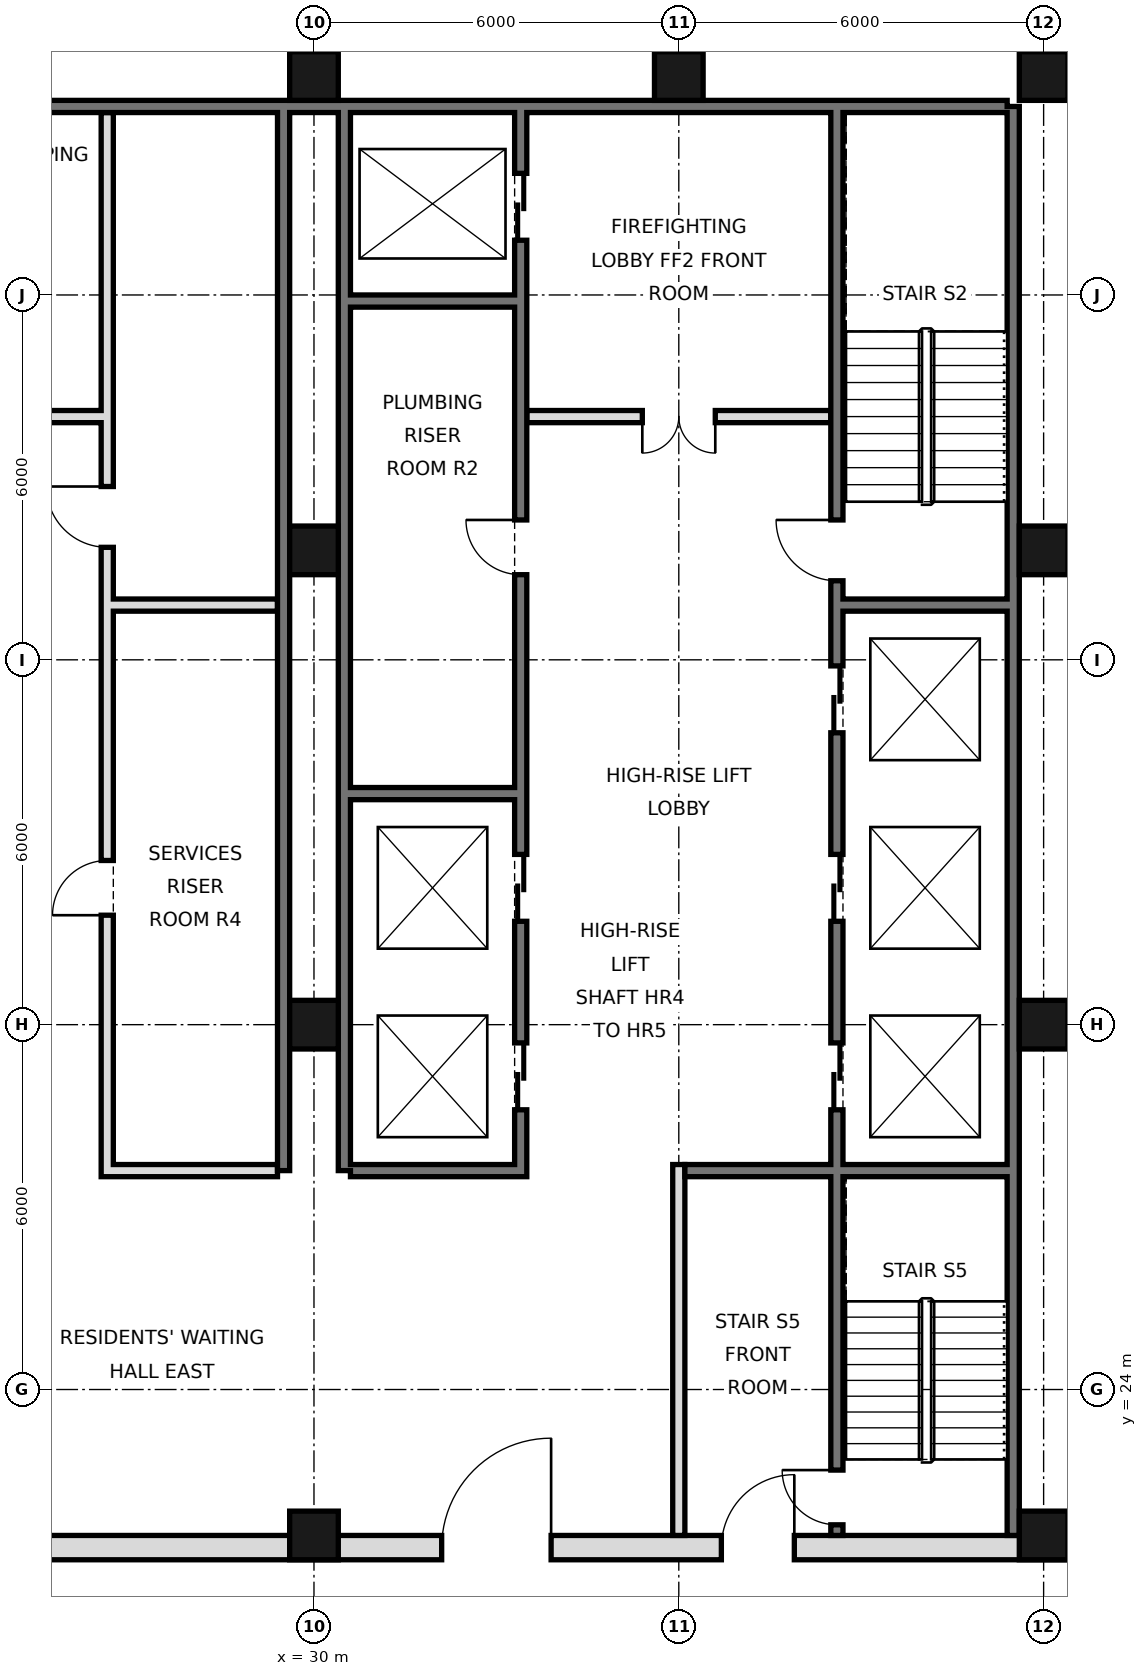
"""IFC4 building model, lengths in metres.
Left out: names, types, materials, properties, quantities, classifications, styles, units other than length and angle.
Written with IfcOpenShell. Run it as: python <this file> out.ifc"""

import sys

from ifc_helpers import new_model, si_unit, direction, frame, frame_2d, origin, origin_2d, place, context, subcontext, project, spatial, rectangle, hollow_rectangle, extrude, element, fill, save


model = new_model("IFC4")
c1 = context("Model", 3, precision=1e-05, world=origin(), true_north=direction((0.0, 1.0)))
c2 = subcontext(c1, "Body", "Model", "MODEL_VIEW")
j1 = project(units=[si_unit("LENGTHUNIT", "METRE"), si_unit("PLANEANGLEUNIT", "RADIAN")], contexts=[c1])
p1 = place(None, origin())
s1 = spatial("IfcSite", under=j1, at=p1, CompositionType="ELEMENT")
p2 = place(p1, origin())
s2 = spatial("IfcBuilding", under=s1, at=p2, CompositionType="ELEMENT")
p3 = place(p2, frame((0.0, 0.0, 246.8)))
s3 = spatial("IfcBuildingStorey", under=s2, at=p3, CompositionType="ELEMENT", Elevation=246.8)
for number, where, z_axis, x_axis in (
    (1, (30.0, 21.6, 0.0), (0.0, 0.0, 1.0), (1.0, 0.0, 0.0)),
    (2, (30.0, 30.0, 0.0), (0.0, 0.0, 1.0), (1.0, 0.0, 0.0)),
    (3, (30.0, 37.8, 0.0), (0.0, 0.0, 1.0), (1.0, 0.0, 0.0)),
    (4, (30.0, 45.6, 0.0), (0.0, 0.0, 1.0), (1.0, 0.0, 0.0)),
    (5, (36.0, 45.6, 0.0), (0.0, 0.0, 1.0), (1.0, 0.0, 0.0)),
    (6, (42.0, 21.6, 0.0), (0.0, 0.0, 1.0), (1.0, 0.0, 0.0)),
    (7, (42.0, 30.0, 0.0), (0.0, 0.0, 1.0), (1.0, 0.0, 0.0)),
    (8, (42.0, 37.8, 0.0), (0.0, 0.0, 1.0), (1.0, 0.0, 0.0)),
    (9, (42.0, 45.6, 0.0), (0.0, 0.0, 1.0), (1.0, 0.0, 0.0)),
):
    element("IfcColumn", number, at=place(p3, frame(where, z_axis=z_axis, x_axis=x_axis)), inside=s3, PredefinedType="COLUMN", context=c2, shape_type="SweptSolid", body=[
        extrude(hollow_rectangle(XDim=0.8, YDim=0.8, WallThickness=0.032, at=origin_2d()), origin(), (0.0, 0.0, 1.0), 3.6),
    ])
p4 = place(p3, frame((41.5, 21.6, 0.0), z_axis=(0.0, 0.0, 1.0), x_axis=(0.0, 1.0, 0.0)))
e10 = element("IfcWall", 10, at=p4, inside=s3, PredefinedType="SOLIDWALL", context=c2, shape_type="SweptSolid", body=[
    extrude(rectangle(XDim=23.5, YDim=0.2, at=frame_2d((11.75, 0.0))), origin(), (0.0, 0.0, 1.0), 3.42),
])
p5 = place(p3, frame((6.6, 45.1, 0.0), z_axis=(0.0, 0.0, 1.0), x_axis=(1.0, 0.0, 0.0)))
e11 = element("IfcWall", 11, at=p5, inside=s3, PredefinedType="SOLIDWALL", context=c2, shape_type="SweptSolid", body=[
    extrude(rectangle(XDim=34.8, YDim=0.2, at=frame_2d((17.4, 0.0))), origin(), (0.0, 0.0, 1.0), 3.42),
])
for number, where, z_axis, x_axis in (
    (12, (29.5, 27.6, 0.0), (0.0, 0.0, 1.0), (0.0, 1.0, 0.0)),
    (13, (30.5, 27.6, 0.0), (0.0, 0.0, 1.0), (0.0, 1.0, 0.0)),
):
    element("IfcWall", number, at=place(p3, frame(where, z_axis=z_axis, x_axis=x_axis)), inside=s3, PredefinedType="SOLIDWALL", context=c2, shape_type="SweptSolid", body=[
        extrude(rectangle(XDim=17.5, YDim=0.2, at=frame_2d((8.75, 0.0))), origin(), (0.0, 0.0, 1.0), 3.42),
    ])
p6 = place(p3, frame((5.6, 21.4, 0.0), z_axis=(0.0, 0.0, 1.0), x_axis=(1.0, 0.0, 0.0)))
e14 = element("IfcWall", 14, at=p6, inside=s3, PredefinedType="SOLIDWALL", context=c2, shape_type="SweptSolid", body=[
    extrude(rectangle(XDim=36.8, YDim=0.4, at=frame_2d((18.4, 0.0))), origin(), (0.0, 0.0, 1.0), 3.42),
])
p7 = place(p6, frame((8.5, 0.0, 0.0)))
e15 = element("IfcOpeningElement", 15, at=p7, cuts=e14, PredefinedType="OPENING", context=c2, shape_type="SweptSolid", body=[
    extrude(rectangle(XDim=1.8, YDim=2.1, at=frame_2d((0.9, 1.05))), frame((0.0, 0.21, 0.0), z_axis=(0.0, -1.0, 0.0), x_axis=(1.0, 0.0, 0.0)), (0.0, 0.0, 1.0), 0.42),
])
p8 = place(p6, frame((17.5, 0.0, 0.0)))
e16 = element("IfcOpeningElement", 16, at=p8, cuts=e14, PredefinedType="OPENING", context=c2, shape_type="SweptSolid", body=[
    extrude(rectangle(XDim=1.8, YDim=2.1, at=frame_2d((0.9, 1.05))), frame((0.0, 0.21, 0.0), z_axis=(0.0, -1.0, 0.0), x_axis=(1.0, 0.0, 0.0)), (0.0, 0.0, 1.0), 0.42),
])
p9 = place(p6, frame((26.5, 0.0, 0.0)))
e17 = element("IfcOpeningElement", 17, at=p9, cuts=e14, PredefinedType="OPENING", context=c2, shape_type="SweptSolid", body=[
    extrude(rectangle(XDim=1.8, YDim=2.1, at=frame_2d((0.9, 1.05))), frame((0.0, 0.21, 0.0), z_axis=(0.0, -1.0, 0.0), x_axis=(1.0, 0.0, 0.0)), (0.0, 0.0, 1.0), 0.42),
])
p10 = place(p6, frame((4.5, 0.0, 0.0)))
e18 = element("IfcOpeningElement", 18, at=p10, cuts=e14, PredefinedType="OPENING", context=c2, shape_type="SweptSolid", body=[
    extrude(rectangle(XDim=1.2, YDim=2.1, at=frame_2d((0.6, 1.05))), frame((0.0, 0.21, 0.0), z_axis=(0.0, -1.0, 0.0), x_axis=(1.0, 0.0, 0.0)), (0.0, 0.0, 1.0), 0.42),
])
p11 = place(p6, frame((31.1, 0.0, 0.0)))
e19 = element("IfcOpeningElement", 19, at=p11, cuts=e14, PredefinedType="OPENING", context=c2, shape_type="SweptSolid", body=[
    extrude(rectangle(XDim=1.2, YDim=2.1, at=frame_2d((0.6, 1.05))), frame((0.0, 0.21, 0.0), z_axis=(0.0, -1.0, 0.0), x_axis=(1.0, 0.0, 0.0)), (0.0, 0.0, 1.0), 0.42),
])
p12 = place(p3, frame((26.6, 27.5, 0.0), z_axis=(0.0, 0.0, 1.0), x_axis=(0.0, 1.0, 0.0)))
e20 = element("IfcWall", 20, at=p12, inside=s3, PredefinedType="SOLIDWALL", context=c2, shape_type="SweptSolid", body=[
    extrude(rectangle(XDim=17.5, YDim=0.2, at=frame_2d((8.75, 0.0))), origin(), (0.0, 0.0, 1.0), 3.42),
])
p13 = place(p12, frame((4.3, 0.0, 0.0)))
e21 = element("IfcOpeningElement", 21, at=p13, cuts=e20, PredefinedType="OPENING", context=c2, shape_type="SweptSolid", body=[
    extrude(rectangle(XDim=0.9, YDim=2.1, at=frame_2d((0.45, 1.05))), frame((0.0, 0.11, 0.0), z_axis=(0.0, -1.0, 0.0), x_axis=(1.0, 0.0, 0.0)), (0.0, 0.0, 1.0), 0.22),
])
p14 = place(p12, frame((10.35, 0.0, 0.0)))
e22 = element("IfcOpeningElement", 22, at=p14, cuts=e20, PredefinedType="OPENING", context=c2, shape_type="SweptSolid", body=[
    extrude(rectangle(XDim=1.0, YDim=2.1, at=frame_2d((0.5, 1.05))), frame((0.0, 0.11, 0.0), z_axis=(0.0, -1.0, 0.0), x_axis=(1.0, 0.0, 0.0)), (0.0, 0.0, 1.0), 0.22),
])
p15 = place(p3, frame((33.4, 27.5, 0.0), z_axis=(0.0, 0.0, 1.0), x_axis=(0.0, 1.0, 0.0)))
e23 = element("IfcWall", 23, at=p15, inside=s3, PredefinedType="SOLIDWALL", context=c2, shape_type="SweptSolid", body=[
    extrude(rectangle(XDim=17.5, YDim=0.2, at=frame_2d((8.75, 0.0))), origin(), (0.0, 0.0, 1.0), 3.42),
])
p16 = place(p15, frame((1.1, 0.0, 0.0)))
e24 = element("IfcOpeningElement", 24, at=p16, cuts=e23, PredefinedType="OPENING", context=c2, shape_type="SweptSolid", body=[
    extrude(rectangle(XDim=1.1, YDim=2.1, at=frame_2d((0.55, 1.05))), frame((0.0, 0.11, 0.0), z_axis=(0.0, -1.0, 0.0), x_axis=(1.0, 0.0, 0.0)), (0.0, 0.0, 1.0), 0.22),
])
p17 = place(p15, frame((4.2, 0.0, 0.0)))
e25 = element("IfcOpeningElement", 25, at=p17, cuts=e23, PredefinedType="OPENING", context=c2, shape_type="SweptSolid", body=[
    extrude(rectangle(XDim=1.1, YDim=2.1, at=frame_2d((0.55, 1.05))), frame((0.0, 0.11, 0.0), z_axis=(0.0, -1.0, 0.0), x_axis=(1.0, 0.0, 0.0)), (0.0, 0.0, 1.0), 0.22),
])
p18 = place(p15, frame((15.4, 0.0, 0.0)))
e26 = element("IfcOpeningElement", 26, at=p18, cuts=e23, PredefinedType="OPENING", context=c2, shape_type="SweptSolid", body=[
    extrude(rectangle(XDim=1.1, YDim=2.1, at=frame_2d((0.55, 1.05))), frame((0.0, 0.11, 0.0), z_axis=(0.0, -1.0, 0.0), x_axis=(1.0, 0.0, 0.0)), (0.0, 0.0, 1.0), 0.22),
])
p19 = place(p15, frame((9.9, 0.0, 0.0)))
e27 = element("IfcOpeningElement", 27, at=p19, cuts=e23, PredefinedType="OPENING", context=c2, shape_type="SweptSolid", body=[
    extrude(rectangle(XDim=0.9, YDim=2.1, at=frame_2d((0.45, 1.05))), frame((0.0, 0.11, 0.0), z_axis=(0.0, -1.0, 0.0), x_axis=(1.0, 0.0, 0.0)), (0.0, 0.0, 1.0), 0.22),
])
p20 = place(p3, frame((36.0, 21.6, 0.0), z_axis=(0.0, 0.0, 1.0), x_axis=(0.0, 1.0, 0.0)))
e28 = element("IfcWall", 28, at=p20, inside=s3, PredefinedType="PARTITIONING", context=c2, shape_type="SweptSolid", body=[
    extrude(rectangle(XDim=6.1, YDim=0.2, at=frame_2d((3.05, 0.0))), origin(), (0.0, 0.0, 1.0), 3.42),
])
p21 = place(p3, frame((38.6, 21.6, 0.0), z_axis=(0.0, 0.0, 1.0), x_axis=(0.0, 1.0, 0.0)))
e29 = element("IfcWall", 29, at=p21, inside=s3, PredefinedType="SOLIDWALL", context=c2, shape_type="SweptSolid", body=[
    extrude(rectangle(XDim=23.4, YDim=0.2, at=frame_2d((11.7, 0.0))), origin(), (0.0, 0.0, 1.0), 3.42),
])
p22 = place(p21, frame((7.0, 0.0, 0.0)))
e30 = element("IfcOpeningElement", 30, at=p22, cuts=e29, PredefinedType="OPENING", context=c2, shape_type="SweptSolid", body=[
    extrude(rectangle(XDim=1.1, YDim=2.1, at=frame_2d((0.55, 1.05))), frame((0.0, 0.11, 0.0), z_axis=(0.0, -1.0, 0.0), x_axis=(1.0, 0.0, 0.0)), (0.0, 0.0, 1.0), 0.22),
])
p23 = place(p21, frame((10.1, 0.0, 0.0)))
e31 = element("IfcOpeningElement", 31, at=p23, cuts=e29, PredefinedType="OPENING", context=c2, shape_type="SweptSolid", body=[
    extrude(rectangle(XDim=1.1, YDim=2.1, at=frame_2d((0.55, 1.05))), frame((0.0, 0.11, 0.0), z_axis=(0.0, -1.0, 0.0), x_axis=(1.0, 0.0, 0.0)), (0.0, 0.0, 1.0), 0.22),
])
p24 = place(p21, frame((13.2, 0.0, 0.0)))
e32 = element("IfcOpeningElement", 32, at=p24, cuts=e29, PredefinedType="OPENING", context=c2, shape_type="SweptSolid", body=[
    extrude(rectangle(XDim=1.1, YDim=2.1, at=frame_2d((0.55, 1.05))), frame((0.0, 0.11, 0.0), z_axis=(0.0, -1.0, 0.0), x_axis=(1.0, 0.0, 0.0)), (0.0, 0.0, 1.0), 0.22),
])
p25 = place(p21, frame((15.7, 0.0, 0.0)))
e33 = element("IfcOpeningElement", 33, at=p25, cuts=e29, PredefinedType="OPENING", context=c2, shape_type="SweptSolid", body=[
    extrude(rectangle(XDim=1.0, YDim=2.1, at=frame_2d((0.5, 1.05))), frame((0.0, 0.11, 0.0), z_axis=(0.0, -1.0, 0.0), x_axis=(1.0, 0.0, 0.0)), (0.0, 0.0, 1.0), 0.22),
])
p26 = place(p21, frame((0.175, 0.0, 0.0)))
e34 = element("IfcOpeningElement", 34, at=p26, cuts=e29, PredefinedType="OPENING", context=c2, shape_type="SweptSolid", body=[
    extrude(rectangle(XDim=0.9, YDim=2.1, at=frame_2d((0.45, 1.05))), frame((0.0, 0.11, 0.0), z_axis=(0.0, -1.0, 0.0), x_axis=(1.0, 0.0, 0.0)), (0.0, 0.0, 1.0), 0.22),
])
for number, where, z_axis, x_axis in (
    (35, (26.7, 27.6, 0.0), (0.0, 0.0, 1.0), (1.0, 0.0, 0.0)),
    (36, (30.6, 27.6, 0.0), (0.0, 0.0, 1.0), (1.0, 0.0, 0.0)),
):
    element("IfcWall", number, at=place(p3, frame(where, z_axis=z_axis, x_axis=x_axis)), inside=s3, PredefinedType="SOLIDWALL", context=c2, shape_type="SweptSolid", body=[
        extrude(rectangle(XDim=2.7, YDim=0.2, at=frame_2d((1.35, 0.0))), origin(), (0.0, 0.0, 1.0), 3.42),
    ])
p27 = place(p3, frame((36.1, 27.6, 0.0), z_axis=(0.0, 0.0, 1.0), x_axis=(1.0, 0.0, 0.0)))
e37 = element("IfcWall", 37, at=p27, inside=s3, PredefinedType="SOLIDWALL", context=c2, shape_type="SweptSolid", body=[
    extrude(rectangle(XDim=5.3, YDim=0.2, at=frame_2d((2.65, 0.0))), origin(), (0.0, 0.0, 1.0), 3.42),
])
for number, where, z_axis, x_axis in (
    (38, (30.6, 33.8, 0.0), (0.0, 0.0, 1.0), (1.0, 0.0, 0.0)),
    (39, (26.7, 36.9, 0.0), (0.0, 0.0, 1.0), (1.0, 0.0, 0.0)),
    (40, (38.7, 36.9, 0.0), (0.0, 0.0, 1.0), (1.0, 0.0, 0.0)),
):
    element("IfcWall", number, at=place(p3, frame(where, z_axis=z_axis, x_axis=x_axis)), inside=s3, PredefinedType="SOLIDWALL", context=c2, shape_type="SweptSolid", body=[
        extrude(rectangle(XDim=2.7, YDim=0.2, at=frame_2d((1.35, 0.0))), origin(), (0.0, 0.0, 1.0), 3.42),
    ])
p28 = place(p3, frame((21.5, 40.0, 0.0), z_axis=(0.0, 0.0, 1.0), x_axis=(1.0, 0.0, 0.0)))
e41 = element("IfcWall", 41, at=p28, inside=s3, PredefinedType="PARTITIONING", context=c2, shape_type="SweptSolid", body=[
    extrude(rectangle(XDim=5.0, YDim=0.2, at=frame_2d((2.5, 0.0))), origin(), (0.0, 0.0, 1.0), 3.42),
])
p29 = place(p28, frame((1.9, 0.0, 0.0)))
e42 = element("IfcOpeningElement", 42, at=p29, cuts=e41, PredefinedType="OPENING", context=c2, shape_type="SweptSolid", body=[
    extrude(rectangle(XDim=1.2, YDim=2.1, at=frame_2d((0.6, 1.05))), frame((0.0, 0.11, 0.0), z_axis=(0.0, -1.0, 0.0), x_axis=(1.0, 0.0, 0.0)), (0.0, 0.0, 1.0), 0.22),
])
p30 = place(p3, frame((33.5, 40.0, 0.0), z_axis=(0.0, 0.0, 1.0), x_axis=(1.0, 0.0, 0.0)))
e43 = element("IfcWall", 43, at=p30, inside=s3, PredefinedType="PARTITIONING", context=c2, shape_type="SweptSolid", body=[
    extrude(rectangle(XDim=5.0, YDim=0.2, at=frame_2d((2.5, 0.0))), origin(), (0.0, 0.0, 1.0), 3.42),
])
p31 = place(p30, frame((1.9, 0.0, 0.0)))
e44 = element("IfcOpeningElement", 44, at=p31, cuts=e43, PredefinedType="OPENING", context=c2, shape_type="SweptSolid", body=[
    extrude(rectangle(XDim=1.2, YDim=2.1, at=frame_2d((0.6, 1.05))), frame((0.0, 0.11, 0.0), z_axis=(0.0, -1.0, 0.0), x_axis=(1.0, 0.0, 0.0)), (0.0, 0.0, 1.0), 0.22),
])
p32 = place(p3, frame((30.6, 41.9, 0.0), z_axis=(0.0, 0.0, 1.0), x_axis=(1.0, 0.0, 0.0)))
e45 = element("IfcWall", 45, at=p32, inside=s3, PredefinedType="SOLIDWALL", context=c2, shape_type="SweptSolid", body=[
    extrude(rectangle(XDim=2.7, YDim=0.2, at=frame_2d((1.35, 0.0))), origin(), (0.0, 0.0, 1.0), 3.42),
])
p33 = place(p9, frame((1.8, 0.0, 0.0), z_axis=(0.0, 0.0, 1.0), x_axis=(-1.0, 0.0, 0.0)))
e46 = element("IfcDoor", 46, at=p33, inside=s3, OperationType="SINGLE_SWING_LEFT", PredefinedType="DOOR", context=c2, shape_type="SweptSolid", body=[
    extrude(rectangle(XDim=1.8, YDim=2.1, at=frame_2d((0.9, 1.05))), frame((0.0, 0.025, 0.0), z_axis=(0.0, -1.0, 0.0), x_axis=(1.0, 0.0, 0.0)), (0.0, 0.0, 1.0), 0.05),
])
fill(e17, e46)
p34 = place(p11, frame((1.2, 0.0, 0.0), z_axis=(0.0, 0.0, 1.0), x_axis=(-1.0, 0.0, 0.0)))
e47 = element("IfcDoor", 47, at=p34, inside=s3, OperationType="SINGLE_SWING_LEFT", PredefinedType="DOOR", context=c2, shape_type="SweptSolid", body=[
    extrude(rectangle(XDim=1.2, YDim=2.1, at=frame_2d((0.6, 1.05))), frame((0.0, 0.025, 0.0), z_axis=(0.0, -1.0, 0.0), x_axis=(1.0, 0.0, 0.0)), (0.0, 0.0, 1.0), 0.05),
])
fill(e19, e47)
p35 = place(p31, frame((1.2, 0.0, 0.0), z_axis=(0.0, 0.0, 1.0), x_axis=(-1.0, 0.0, 0.0)))
e48 = element("IfcDoor", 48, at=p35, inside=s3, OperationType="DOUBLE_DOOR_SINGLE_SWING", PredefinedType="DOOR", context=c2, shape_type="SweptSolid", body=[
    extrude(rectangle(XDim=1.2, YDim=2.1, at=frame_2d((0.6, 1.05))), frame((0.0, 0.025, 0.0), z_axis=(0.0, -1.0, 0.0), x_axis=(1.0, 0.0, 0.0)), (0.0, 0.0, 1.0), 0.05),
])
fill(e44, e48)
p36 = place(p22, origin())
e49 = element("IfcDoor", 49, at=p36, inside=s3, OperationType="DOUBLE_DOOR_SLIDING", PredefinedType="DOOR", context=c2, shape_type="SweptSolid", body=[
    extrude(rectangle(XDim=1.1, YDim=2.1, at=frame_2d((0.55, 1.05))), frame((0.0, 0.025, 0.0), z_axis=(0.0, -1.0, 0.0), x_axis=(1.0, 0.0, 0.0)), (0.0, 0.0, 1.0), 0.05),
])
fill(e30, e49)
p37 = place(p23, origin())
e50 = element("IfcDoor", 50, at=p37, inside=s3, OperationType="DOUBLE_DOOR_SLIDING", PredefinedType="DOOR", context=c2, shape_type="SweptSolid", body=[
    extrude(rectangle(XDim=1.1, YDim=2.1, at=frame_2d((0.55, 1.05))), frame((0.0, 0.025, 0.0), z_axis=(0.0, -1.0, 0.0), x_axis=(1.0, 0.0, 0.0)), (0.0, 0.0, 1.0), 0.05),
])
fill(e31, e50)
p38 = place(p24, origin())
e51 = element("IfcDoor", 51, at=p38, inside=s3, OperationType="DOUBLE_DOOR_SLIDING", PredefinedType="DOOR", context=c2, shape_type="SweptSolid", body=[
    extrude(rectangle(XDim=1.1, YDim=2.1, at=frame_2d((0.55, 1.05))), frame((0.0, 0.025, 0.0), z_axis=(0.0, -1.0, 0.0), x_axis=(1.0, 0.0, 0.0)), (0.0, 0.0, 1.0), 0.05),
])
fill(e32, e51)
p39 = place(p16, origin())
e52 = element("IfcDoor", 52, at=p39, inside=s3, OperationType="DOUBLE_DOOR_SLIDING", PredefinedType="DOOR", context=c2, shape_type="SweptSolid", body=[
    extrude(rectangle(XDim=1.1, YDim=2.1, at=frame_2d((0.55, 1.05))), frame((0.0, 0.025, 0.0), z_axis=(0.0, -1.0, 0.0), x_axis=(1.0, 0.0, 0.0)), (0.0, 0.0, 1.0), 0.05),
])
fill(e24, e52)
p40 = place(p17, origin())
e53 = element("IfcDoor", 53, at=p40, inside=s3, OperationType="DOUBLE_DOOR_SLIDING", PredefinedType="DOOR", context=c2, shape_type="SweptSolid", body=[
    extrude(rectangle(XDim=1.1, YDim=2.1, at=frame_2d((0.55, 1.05))), frame((0.0, 0.025, 0.0), z_axis=(0.0, -1.0, 0.0), x_axis=(1.0, 0.0, 0.0)), (0.0, 0.0, 1.0), 0.05),
])
fill(e25, e53)
p41 = place(p18, origin())
e54 = element("IfcDoor", 54, at=p41, inside=s3, OperationType="DOUBLE_DOOR_SLIDING", PredefinedType="DOOR", context=c2, shape_type="SweptSolid", body=[
    extrude(rectangle(XDim=1.1, YDim=2.1, at=frame_2d((0.55, 1.05))), frame((0.0, 0.025, 0.0), z_axis=(0.0, -1.0, 0.0), x_axis=(1.0, 0.0, 0.0)), (0.0, 0.0, 1.0), 0.05),
])
fill(e26, e54)
p42 = place(p25, frame((1.0, 0.0, 0.0), z_axis=(0.0, 0.0, 1.0), x_axis=(-1.0, 0.0, 0.0)))
e55 = element("IfcDoor", 55, at=p42, inside=s3, OperationType="SINGLE_SWING_LEFT", PredefinedType="DOOR", context=c2, shape_type="SweptSolid", body=[
    extrude(rectangle(XDim=1.0, YDim=2.1, at=frame_2d((0.5, 1.05))), frame((0.0, 0.025, 0.0), z_axis=(0.0, -1.0, 0.0), x_axis=(1.0, 0.0, 0.0)), (0.0, 0.0, 1.0), 0.05),
])
fill(e33, e55)
p43 = place(p26, frame((0.9, 0.0, 0.0), z_axis=(0.0, 0.0, 1.0), x_axis=(-1.0, 0.0, 0.0)))
e56 = element("IfcDoor", 56, at=p43, inside=s3, OperationType="SINGLE_SWING_LEFT", PredefinedType="DOOR", context=c2, shape_type="SweptSolid", body=[
    extrude(rectangle(XDim=0.9, YDim=2.1, at=frame_2d((0.45, 1.05))), frame((0.0, 0.025, 0.0), z_axis=(0.0, -1.0, 0.0), x_axis=(1.0, 0.0, 0.0)), (0.0, 0.0, 1.0), 0.05),
])
fill(e34, e56)
p44 = place(p19, frame((0.9, 0.0, 0.0), z_axis=(0.0, 0.0, 1.0), x_axis=(-1.0, 0.0, 0.0)))
e57 = element("IfcDoor", 57, at=p44, inside=s3, OperationType="SINGLE_SWING_LEFT", PredefinedType="DOOR", context=c2, shape_type="SweptSolid", body=[
    extrude(rectangle(XDim=0.9, YDim=2.1, at=frame_2d((0.45, 1.05))), frame((0.0, 0.025, 0.0), z_axis=(0.0, -1.0, 0.0), x_axis=(1.0, 0.0, 0.0)), (0.0, 0.0, 1.0), 0.05),
])
fill(e27, e57)
p45 = place(p13, origin())
e58 = element("IfcDoor", 58, at=p45, inside=s3, OperationType="SINGLE_SWING_LEFT", PredefinedType="DOOR", context=c2, shape_type="SweptSolid", body=[
    extrude(rectangle(XDim=0.9, YDim=2.1, at=frame_2d((0.45, 1.05))), frame((0.0, 0.025, 0.0), z_axis=(0.0, -1.0, 0.0), x_axis=(1.0, 0.0, 0.0)), (0.0, 0.0, 1.0), 0.05),
])
fill(e21, e58)
p46 = place(p14, frame((1.0, 0.0, 0.0), z_axis=(0.0, 0.0, 1.0), x_axis=(-1.0, 0.0, 0.0)))
e59 = element("IfcDoor", 59, at=p46, inside=s3, OperationType="SINGLE_SWING_LEFT", PredefinedType="DOOR", context=c2, shape_type="SweptSolid", body=[
    extrude(rectangle(XDim=1.0, YDim=2.1, at=frame_2d((0.5, 1.05))), frame((0.0, 0.025, 0.0), z_axis=(0.0, -1.0, 0.0), x_axis=(1.0, 0.0, 0.0)), (0.0, 0.0, 1.0), 0.05),
])
fill(e22, e59)
save(model, sys.argv[1])
